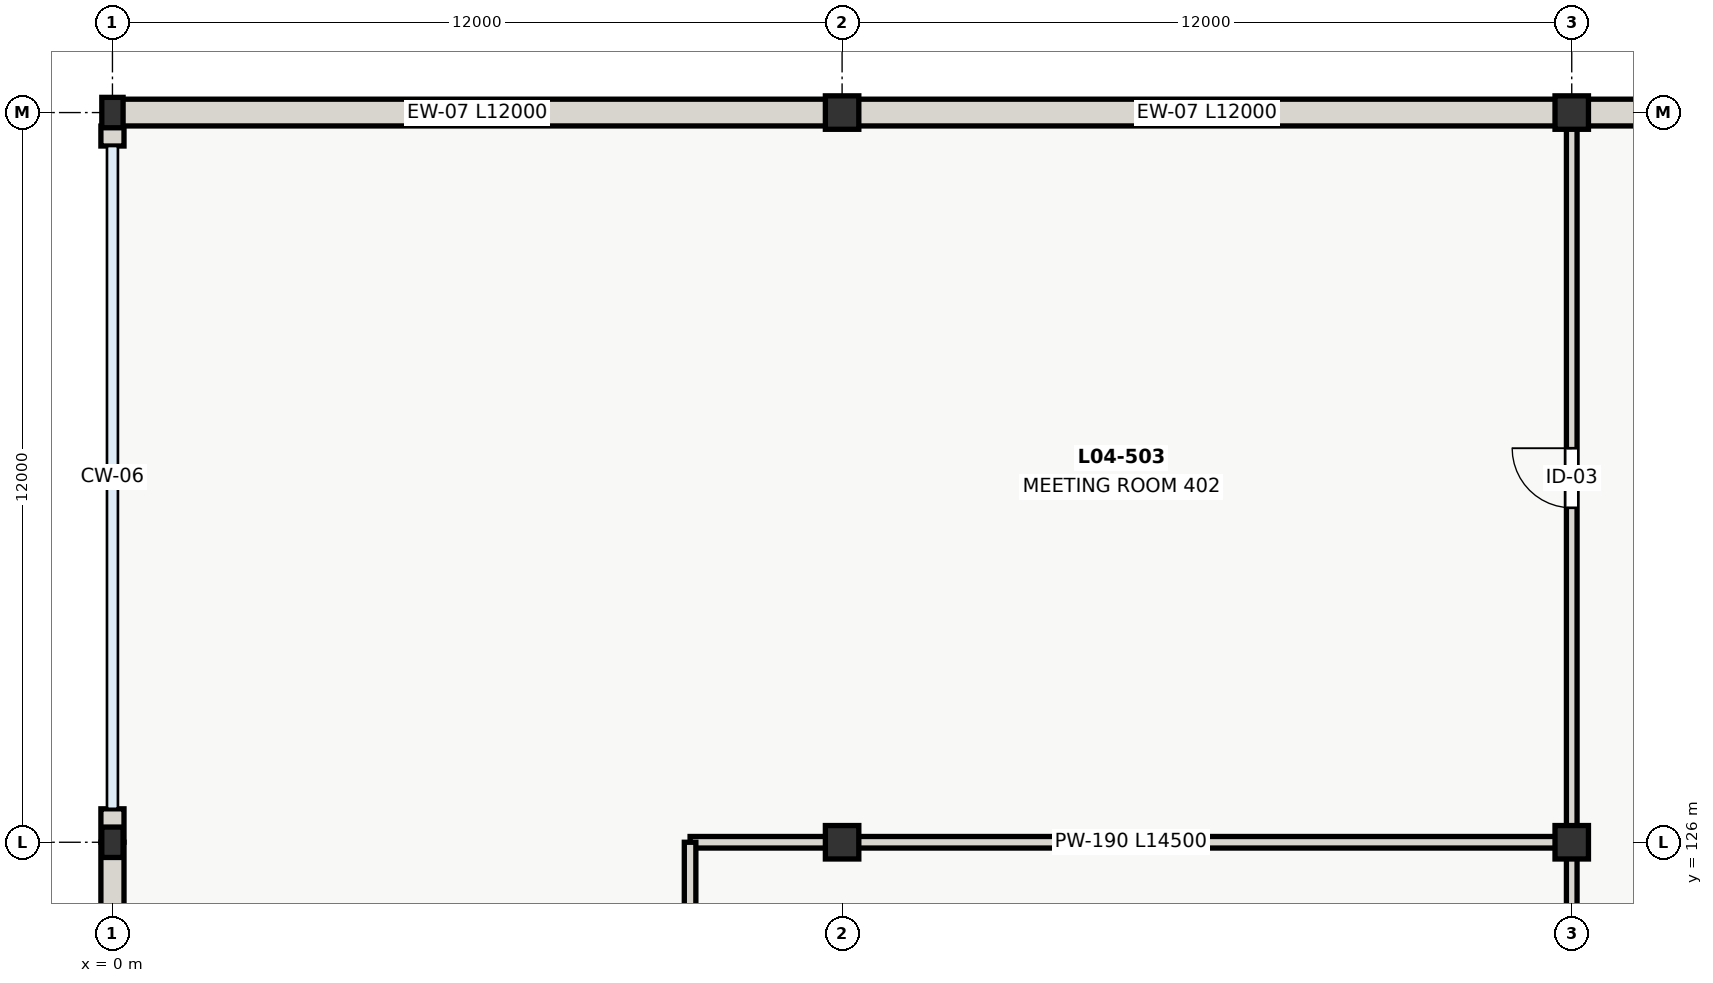
"""IFC4 building model, lengths in metres.
Left out: names, types, materials, properties, quantities, classifications, styles, units other than length and angle.
Written with IfcOpenShell. Run it as: python <this file> out.ifc"""

import sys

from ifc_helpers import new_model, si_unit, direction, frame, frame_2d, origin, origin_2d, place, context, subcontext, project, spatial, rectangle, extrude, element, fill, save


model = new_model("IFC4")
c1 = context("Model", 3, precision=1e-05, world=origin(), true_north=direction((0.0, 1.0)))
c2 = subcontext(c1, "Body", "Model", "MODEL_VIEW")
j1 = project(units=[si_unit("LENGTHUNIT", "METRE"), si_unit("PLANEANGLEUNIT", "RADIAN")], contexts=[c1])
p1 = place(None, origin())
s1 = spatial("IfcSite", under=j1, at=p1, CompositionType="ELEMENT")
p2 = place(p1, origin())
s2 = spatial("IfcBuilding", under=s1, at=p2, CompositionType="ELEMENT")
p3 = place(p2, frame((0.0, 0.0, 12.6)))
s3 = spatial("IfcBuildingStorey", under=s2, at=p3, CompositionType="ELEMENT", Elevation=12.6)
p4 = place(p3, frame((0.0, 126.0, 0.0), z_axis=(0.0, 0.0, 1.0), x_axis=(1.0, 0.0, 0.0)))
e1 = element("IfcColumn", 1, at=p4, inside=s3, PredefinedType="PILASTER", context=c2, shape_type="SweptSolid", body=[
    extrude(rectangle(XDim=0.35, YDim=0.5, at=origin_2d()), origin(), (0.0, 0.0, 1.0), 4.2),
])
for number, where, z_axis, x_axis in (
    (2, (12.0, 126.0, 0.0), (0.0, 0.0, 1.0), (1.0, 0.0, 0.0)),
    (3, (24.0, 126.0, 0.0), (0.0, 0.0, 1.0), (1.0, 0.0, 0.0)),
):
    element("IfcColumn", number, at=place(p3, frame(where, z_axis=z_axis, x_axis=x_axis)), inside=s3, PredefinedType="COLUMN", context=c2, shape_type="SweptSolid", body=[
        extrude(rectangle(XDim=0.55, YDim=0.55, at=origin_2d()), origin(), (0.0, 0.0, 1.0), 4.2),
    ])
p5 = place(p3, frame((0.0, 138.0, 0.0), z_axis=(0.0, 0.0, 1.0), x_axis=(1.0, 0.0, 0.0)))
e4 = element("IfcColumn", 4, at=p5, inside=s3, PredefinedType="PILASTER", context=c2, shape_type="SweptSolid", body=[
    extrude(rectangle(XDim=0.35, YDim=0.5, at=origin_2d()), origin(), (0.0, 0.0, 1.0), 4.2),
])
for number, where, z_axis, x_axis in (
    (5, (12.0, 138.0, 0.0), (0.0, 0.0, 1.0), (1.0, 0.0, 0.0)),
    (6, (24.0, 138.0, 0.0), (0.0, 0.0, 1.0), (1.0, 0.0, 0.0)),
):
    element("IfcColumn", number, at=place(p3, frame(where, z_axis=z_axis, x_axis=x_axis)), inside=s3, PredefinedType="COLUMN", context=c2, shape_type="SweptSolid", body=[
        extrude(rectangle(XDim=0.55, YDim=0.55, at=origin_2d()), origin(), (0.0, 0.0, 1.0), 4.2),
    ])
p6 = place(p3, frame((0.0, 120.0, 0.0), z_axis=(0.0, 0.0, 1.0), x_axis=(0.0, 1.0, 0.0)))
e7 = element("IfcWall", 7, at=p6, inside=s3, PredefinedType="SOLIDWALL", context=c2, shape_type="SweptSolid", body=[
    extrude(rectangle(XDim=6.0, YDim=0.38, at=frame_2d((3.0, 0.0))), origin(), (0.0, 0.0, 1.0), 3.59),
])
p7 = place(p6, frame((2.3, 0.0, 0.9)))
e8 = element("IfcOpeningElement", 8, at=p7, cuts=e7, PredefinedType="OPENING", context=c2, shape_type="SweptSolid", body=[
    extrude(rectangle(XDim=1.4, YDim=1.95, at=frame_2d((0.7, 0.975))), frame((0.0, 0.2, 0.0), z_axis=(0.0, -1.0, 0.0), x_axis=(1.0, 0.0, 0.0)), (0.0, 0.0, 1.0), 0.4),
])
p8 = place(p3, frame((0.0, 126.002, 0.0), z_axis=(0.0, 0.0, 1.0), x_axis=(0.0, 1.0, 0.0)))
e9 = element("IfcWall", 9, at=p8, inside=s3, PredefinedType="SOLIDWALL", context=c2, shape_type="SweptSolid", body=[
    extrude(rectangle(XDim=0.548, YDim=0.38, at=frame_2d((0.274, 0.0))), origin(), (0.0, 0.0, 1.0), 3.5),
])
p9 = place(p3, frame((0.0, 137.45, 0.0), z_axis=(0.0, 0.0, 1.0), x_axis=(0.0, 1.0, 0.0)))
e10 = element("IfcWall", 10, at=p9, inside=s3, PredefinedType="SOLIDWALL", context=c2, shape_type="SweptSolid", body=[
    extrude(rectangle(XDim=0.328, YDim=0.38, at=frame_2d((0.164, 0.0))), origin(), (0.0, 0.0, 1.0), 3.5),
])
for number, where, z_axis, x_axis in (
    (11, (0.0, 138.0, 0.0), (0.0, 0.0, 1.0), (1.0, 0.0, 0.0)),
    (12, (12.0, 138.0, 0.0), (0.0, 0.0, 1.0), (1.0, 0.0, 0.0)),
    (13, (24.0, 138.0, 0.0), (0.0, 0.0, 1.0), (1.0, 0.0, 0.0)),
):
    element("IfcWall", number, at=place(p3, frame(where, z_axis=z_axis, x_axis=x_axis)), inside=s3, PredefinedType="SHEAR", context=c2, shape_type="SweptSolid", body=[
        extrude(rectangle(XDim=12.0, YDim=0.44, at=frame_2d((6.0, 0.0))), origin(), (0.0, 0.0, 1.0), 4.2),
    ])
p10 = place(p2, frame((0.0, 0.0, 8.4)))
s4 = spatial("IfcBuildingStorey", under=s2, at=p10, CompositionType="ELEMENT", Elevation=8.4)
p11 = place(p10, frame((0.0, 138.0, 0.0), z_axis=(0.0, 0.0, 1.0), x_axis=(0.0, 1.0, 0.0)))
e14 = element("IfcWall", 14, at=p11, inside=s4, PredefinedType="SHEAR", context=c2, shape_type="SweptSolid", body=[
    extrude(rectangle(XDim=12.0, YDim=0.44, at=frame_2d((6.0, 0.0))), origin(), (0.0, 0.0, 1.0), 5.65),
])
p12 = place(p11, frame((2.7, 0.0, 1.8)))
e15 = element("IfcOpeningElement", 15, at=p12, cuts=e14, PredefinedType="OPENING", context=c2, shape_type="SweptSolid", body=[
    extrude(rectangle(XDim=1.8, YDim=1.05, at=frame_2d((0.9, 0.525))), frame((0.0, 0.23, 0.0), z_axis=(0.0, -1.0, 0.0), x_axis=(1.0, 0.0, 0.0)), (0.0, 0.0, 1.0), 0.46),
])
p13 = place(p11, frame((7.5, 0.0, 1.8)))
e16 = element("IfcOpeningElement", 16, at=p13, cuts=e14, PredefinedType="OPENING", context=c2, shape_type="SweptSolid", body=[
    extrude(rectangle(XDim=1.8, YDim=1.05, at=frame_2d((0.9, 0.525))), frame((0.0, 0.23, 0.0), z_axis=(0.0, -1.0, 0.0), x_axis=(1.0, 0.0, 0.0)), (0.0, 0.0, 1.0), 0.46),
])
p14 = place(p3, frame((24.0, 84.22, 0.0), z_axis=(0.0, 0.0, 1.0), x_axis=(0.0, 1.0, 0.0)))
e17 = element("IfcWall", 17, at=p14, inside=s3, PredefinedType="PARTITIONING", context=c2, shape_type="SweptSolid", body=[
    extrude(rectangle(XDim=53.56, YDim=0.175, at=frame_2d((26.78, 0.0))), origin(), (0.0, 0.0, 1.0), 3.28),
])
p15 = place(p14, frame((1.98, 0.0, 0.0)))
e18 = element("IfcOpeningElement", 18, at=p15, cuts=e17, PredefinedType="OPENING", context=c2, shape_type="SweptSolid", body=[
    extrude(rectangle(XDim=1.05, YDim=2.1, at=frame_2d((0.525, 1.05))), frame((0.0, 0.097, 0.0), z_axis=(0.0, -1.0, 0.0), x_axis=(1.0, 0.0, 0.0)), (0.0, 0.0, 1.0), 0.195),
])
p16 = place(p14, frame((10.28, 0.0, 0.0)))
e19 = element("IfcOpeningElement", 19, at=p16, cuts=e17, PredefinedType="OPENING", context=c2, shape_type="SweptSolid", body=[
    extrude(rectangle(XDim=1.8, YDim=2.15, at=frame_2d((0.9, 1.075))), frame((0.0, 0.097, 0.0), z_axis=(0.0, -1.0, 0.0), x_axis=(1.0, 0.0, 0.0)), (0.0, 0.0, 1.0), 0.195),
])
p17 = place(p14, frame((14.58, 0.0, 0.0)))
e20 = element("IfcOpeningElement", 20, at=p17, cuts=e17, PredefinedType="OPENING", context=c2, shape_type="SweptSolid", body=[
    extrude(rectangle(XDim=1.05, YDim=2.1, at=frame_2d((0.525, 1.05))), frame((0.0, 0.097, 0.0), z_axis=(0.0, -1.0, 0.0), x_axis=(1.0, 0.0, 0.0)), (0.0, 0.0, 1.0), 0.195),
])
p18 = place(p14, frame((25.78, 0.0, 0.0)))
e21 = element("IfcOpeningElement", 21, at=p18, cuts=e17, PredefinedType="OPENING", context=c2, shape_type="SweptSolid", body=[
    extrude(rectangle(XDim=1.05, YDim=2.1, at=frame_2d((0.525, 1.05))), frame((0.0, 0.097, 0.0), z_axis=(0.0, -1.0, 0.0), x_axis=(1.0, 0.0, 0.0)), (0.0, 0.0, 1.0), 0.195),
])
p19 = place(p14, frame((37.98, 0.0, 0.0)))
e22 = element("IfcOpeningElement", 22, at=p19, cuts=e17, PredefinedType="OPENING", context=c2, shape_type="SweptSolid", body=[
    extrude(rectangle(XDim=1.0, YDim=2.1, at=frame_2d((0.5, 1.05))), frame((0.0, 0.097, 0.0), z_axis=(0.0, -1.0, 0.0), x_axis=(1.0, 0.0, 0.0)), (0.0, 0.0, 1.0), 0.195),
])
p20 = place(p14, frame((47.28, 0.0, 0.0)))
e23 = element("IfcOpeningElement", 23, at=p20, cuts=e17, PredefinedType="OPENING", context=c2, shape_type="SweptSolid", body=[
    extrude(rectangle(XDim=0.98, YDim=2.1, at=frame_2d((0.49, 1.05))), frame((0.0, 0.097, 0.0), z_axis=(0.0, -1.0, 0.0), x_axis=(1.0, 0.0, 0.0)), (0.0, 0.0, 1.0), 0.195),
])
p21 = place(p3, frame((9.5, 126.0, 0.0), z_axis=(0.0, 0.0, 1.0), x_axis=(1.0, 0.0, 0.0)))
e24 = element("IfcWall", 24, at=p21, inside=s3, PredefinedType="PLUMBINGWALL", context=c2, shape_type="SweptSolid", body=[
    extrude(rectangle(XDim=14.5, YDim=0.19, at=frame_2d((7.25, 0.0))), origin(), (0.0, 0.0, 1.0), 3.44),
])
p22 = place(p3, frame((9.5, 120.0, 0.0), z_axis=(0.0, 0.0, 1.0), x_axis=(0.0, 1.0, 0.0)))
e25 = element("IfcWall", 25, at=p22, inside=s3, PredefinedType="PLUMBINGWALL", context=c2, shape_type="SweptSolid", body=[
    extrude(rectangle(XDim=6.0, YDim=0.19, at=frame_2d((3.0, 0.0))), origin(), (0.0, 0.0, 1.0), 3.78),
])
p23 = place(p20, origin())
e26 = element("IfcDoor", 26, at=p23, inside=s3, OperationType="SINGLE_SWING_RIGHT", PredefinedType="DOOR", context=c2, shape_type="SweptSolid", body=[
    extrude(rectangle(XDim=0.98, YDim=2.1, at=frame_2d((0.49, 1.05))), frame((0.0, 0.025, 0.0), z_axis=(0.0, -1.0, 0.0), x_axis=(1.0, 0.0, 0.0)), (0.0, 0.0, 1.0), 0.05),
])
fill(e23, e26)
save(model, sys.argv[1])
